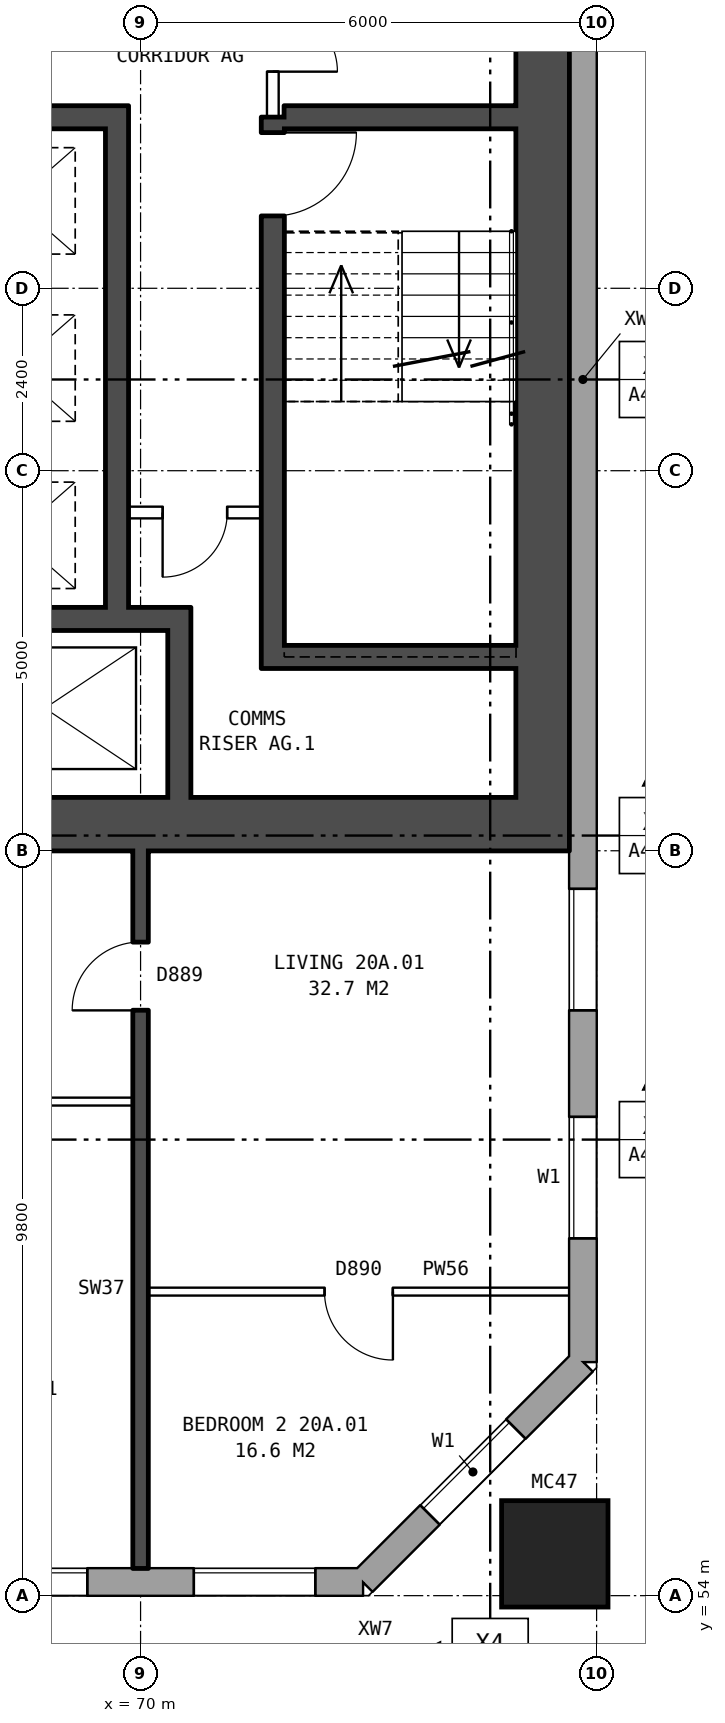
"""IFC4 building model, lengths in metres.
Left out: names, types, materials, properties, quantities, classifications, styles, units other than length and angle.
Written with IfcOpenShell. Run it as: python <this file> out.ifc"""

import sys

from ifc_helpers import new_model, si_unit, direction, frame, frame_2d, origin, origin_2d, place, context, subcontext, project, spatial, rectangle, hollow_rectangle, extrude, element, fill, save


model = new_model("IFC4")
c1 = context("Model", 3, precision=1e-05, world=origin(), true_north=direction((0.0, 1.0)))
c2 = subcontext(c1, "Body", "Model", "MODEL_VIEW")
j1 = project(units=[si_unit("LENGTHUNIT", "METRE"), si_unit("PLANEANGLEUNIT", "RADIAN")], contexts=[c1])
p1 = place(None, origin())
s1 = spatial("IfcSite", under=j1, at=p1, CompositionType="ELEMENT")
p2 = place(p1, origin())
s2 = spatial("IfcBuilding", under=s1, at=p2, CompositionType="ELEMENT")
p3 = place(p2, frame((0.0, 0.0, 74.7)))
s3 = spatial("IfcBuildingStorey", under=s2, at=p3, CompositionType="ELEMENT", Elevation=74.7)
p4 = place(p3, frame((75.45, 54.55, 0.0), z_axis=(0.0, 0.0, 1.0), x_axis=(1.0, 0.0, 0.0)))
e1 = element("IfcColumn", 1, at=p4, inside=s3, PredefinedType="COLUMN", context=c2, shape_type="SweptSolid", body=[
    extrude(hollow_rectangle(XDim=1.4, YDim=1.4, WallThickness=0.075, at=origin_2d()), origin(), (0.0, 0.0, 1.0), 3.1),
])
p5 = place(p3, frame((26.325, 54.18, 0.0), z_axis=(0.0, 0.0, 1.0), x_axis=(1.0, 0.0, 0.0)))
e2 = element("IfcWall", 2, at=p5, inside=s3, PredefinedType="STANDARD", context=c2, shape_type="SweptSolid", body=[
    extrude(rectangle(XDim=46.601, YDim=0.36, at=frame_2d((23.3, 0.0))), origin(), (0.0, 0.0, 1.0), 2.85),
])
p6 = place(p5, frame((2.375, 0.0, 0.8)))
e3 = element("IfcOpeningElement", 3, at=p6, cuts=e2, PredefinedType="OPENING", context=c2, shape_type="SweptSolid", body=[
    extrude(rectangle(XDim=1.6, YDim=1.8, at=frame_2d((0.8, 0.9))), frame((0.0, 0.19, 0.0), z_axis=(0.0, -1.0, 0.0), x_axis=(1.0, 0.0, 0.0)), (0.0, 0.0, 1.0), 0.38),
])
p7 = place(p5, frame((4.275, 0.0, 0.8)))
e4 = element("IfcOpeningElement", 4, at=p7, cuts=e2, PredefinedType="OPENING", context=c2, shape_type="SweptSolid", body=[
    extrude(rectangle(XDim=1.6, YDim=1.8, at=frame_2d((0.8, 0.9))), frame((0.0, 0.19, 0.0), z_axis=(0.0, -1.0, 0.0), x_axis=(1.0, 0.0, 0.0)), (0.0, 0.0, 1.0), 0.38),
])
p8 = place(p5, frame((8.275, 0.0, 0.8)))
e5 = element("IfcOpeningElement", 5, at=p8, cuts=e2, PredefinedType="OPENING", context=c2, shape_type="SweptSolid", body=[
    extrude(rectangle(XDim=0.8, YDim=0.9, at=frame_2d((0.4, 0.45))), frame((0.0, 0.19, 0.0), z_axis=(0.0, -1.0, 0.0), x_axis=(1.0, 0.0, 0.0)), (0.0, 0.0, 1.0), 0.38),
])
p9 = place(p5, frame((11.375, 0.0, 0.8)))
e6 = element("IfcOpeningElement", 6, at=p9, cuts=e2, PredefinedType="OPENING", context=c2, shape_type="SweptSolid", body=[
    extrude(rectangle(XDim=1.6, YDim=1.8, at=frame_2d((0.8, 0.9))), frame((0.0, 0.19, 0.0), z_axis=(0.0, -1.0, 0.0), x_axis=(1.0, 0.0, 0.0)), (0.0, 0.0, 1.0), 0.38),
])
p10 = place(p5, frame((14.375, 0.0, 0.8)))
e7 = element("IfcOpeningElement", 7, at=p10, cuts=e2, PredefinedType="OPENING", context=c2, shape_type="SweptSolid", body=[
    extrude(rectangle(XDim=1.6, YDim=1.8, at=frame_2d((0.8, 0.9))), frame((0.0, 0.19, 0.0), z_axis=(0.0, -1.0, 0.0), x_axis=(1.0, 0.0, 0.0)), (0.0, 0.0, 1.0), 0.38),
])
p11 = place(p5, frame((17.375, 0.0, 0.8)))
e8 = element("IfcOpeningElement", 8, at=p11, cuts=e2, PredefinedType="OPENING", context=c2, shape_type="SweptSolid", body=[
    extrude(rectangle(XDim=1.6, YDim=1.8, at=frame_2d((0.8, 0.9))), frame((0.0, 0.19, 0.0), z_axis=(0.0, -1.0, 0.0), x_axis=(1.0, 0.0, 0.0)), (0.0, 0.0, 1.0), 0.38),
])
p12 = place(p5, frame((20.375, 0.0, 0.8)))
e9 = element("IfcOpeningElement", 9, at=p12, cuts=e2, PredefinedType="OPENING", context=c2, shape_type="SweptSolid", body=[
    extrude(rectangle(XDim=1.6, YDim=1.8, at=frame_2d((0.8, 0.9))), frame((0.0, 0.19, 0.0), z_axis=(0.0, -1.0, 0.0), x_axis=(1.0, 0.0, 0.0)), (0.0, 0.0, 1.0), 0.38),
])
p13 = place(p5, frame((23.375, 0.0, 0.8)))
e10 = element("IfcOpeningElement", 10, at=p13, cuts=e2, PredefinedType="OPENING", context=c2, shape_type="SweptSolid", body=[
    extrude(rectangle(XDim=1.6, YDim=1.8, at=frame_2d((0.8, 0.9))), frame((0.0, 0.19, 0.0), z_axis=(0.0, -1.0, 0.0), x_axis=(1.0, 0.0, 0.0)), (0.0, 0.0, 1.0), 0.38),
])
p14 = place(p5, frame((26.375, 0.0, 0.8)))
e11 = element("IfcOpeningElement", 11, at=p14, cuts=e2, PredefinedType="OPENING", context=c2, shape_type="SweptSolid", body=[
    extrude(rectangle(XDim=1.6, YDim=1.8, at=frame_2d((0.8, 0.9))), frame((0.0, 0.19, 0.0), z_axis=(0.0, -1.0, 0.0), x_axis=(1.0, 0.0, 0.0)), (0.0, 0.0, 1.0), 0.38),
])
p15 = place(p5, frame((29.375, 0.0, 0.8)))
e12 = element("IfcOpeningElement", 12, at=p15, cuts=e2, PredefinedType="OPENING", context=c2, shape_type="SweptSolid", body=[
    extrude(rectangle(XDim=1.6, YDim=1.8, at=frame_2d((0.8, 0.9))), frame((0.0, 0.19, 0.0), z_axis=(0.0, -1.0, 0.0), x_axis=(1.0, 0.0, 0.0)), (0.0, 0.0, 1.0), 0.38),
])
p16 = place(p5, frame((32.375, 0.0, 0.8)))
e13 = element("IfcOpeningElement", 13, at=p16, cuts=e2, PredefinedType="OPENING", context=c2, shape_type="SweptSolid", body=[
    extrude(rectangle(XDim=1.6, YDim=1.8, at=frame_2d((0.8, 0.9))), frame((0.0, 0.19, 0.0), z_axis=(0.0, -1.0, 0.0), x_axis=(1.0, 0.0, 0.0)), (0.0, 0.0, 1.0), 0.38),
])
p17 = place(p5, frame((35.375, 0.0, 0.8)))
e14 = element("IfcOpeningElement", 14, at=p17, cuts=e2, PredefinedType="OPENING", context=c2, shape_type="SweptSolid", body=[
    extrude(rectangle(XDim=1.6, YDim=1.8, at=frame_2d((0.8, 0.9))), frame((0.0, 0.19, 0.0), z_axis=(0.0, -1.0, 0.0), x_axis=(1.0, 0.0, 0.0)), (0.0, 0.0, 1.0), 0.38),
])
p18 = place(p5, frame((39.625, 0.0, 1.7)))
e15 = element("IfcOpeningElement", 15, at=p18, cuts=e2, PredefinedType="OPENING", context=c2, shape_type="SweptSolid", body=[
    extrude(rectangle(XDim=1.4, YDim=0.9, at=frame_2d((0.7, 0.45))), frame((0.0, 0.19, 0.0), z_axis=(0.0, -1.0, 0.0), x_axis=(1.0, 0.0, 0.0)), (0.0, 0.0, 1.0), 0.38),
])
p19 = place(p5, frame((41.375, 0.0, 0.8)))
e16 = element("IfcOpeningElement", 16, at=p19, cuts=e2, PredefinedType="OPENING", context=c2, shape_type="SweptSolid", body=[
    extrude(rectangle(XDim=1.6, YDim=1.8, at=frame_2d((0.8, 0.9))), frame((0.0, 0.19, 0.0), z_axis=(0.0, -1.0, 0.0), x_axis=(1.0, 0.0, 0.0)), (0.0, 0.0, 1.0), 0.38),
])
p20 = place(p5, frame((44.375, 0.0, 0.8)))
e17 = element("IfcOpeningElement", 17, at=p20, cuts=e2, PredefinedType="OPENING", context=c2, shape_type="SweptSolid", body=[
    extrude(rectangle(XDim=1.6, YDim=1.8, at=frame_2d((0.8, 0.9))), frame((0.0, 0.19, 0.0), z_axis=(0.0, -1.0, 0.0), x_axis=(1.0, 0.0, 0.0)), (0.0, 0.0, 1.0), 0.38),
])
p21 = place(p5, frame((6.175, 0.0, 1.7)))
e18 = element("IfcOpeningElement", 18, at=p21, cuts=e2, PredefinedType="OPENING", context=c2, shape_type="SweptSolid", body=[
    extrude(rectangle(XDim=0.8, YDim=0.9, at=frame_2d((0.4, 0.45))), frame((0.0, 0.19, 0.0), z_axis=(0.0, -1.0, 0.0), x_axis=(1.0, 0.0, 0.0)), (0.0, 0.0, 1.0), 0.38),
])
p22 = place(p5, frame((9.375, 0.0, 0.8)))
e19 = element("IfcOpeningElement", 19, at=p22, cuts=e2, PredefinedType="OPENING", context=c2, shape_type="SweptSolid", body=[
    extrude(rectangle(XDim=1.0, YDim=1.8, at=frame_2d((0.5, 0.9))), frame((0.0, 0.19, 0.0), z_axis=(0.0, -1.0, 0.0), x_axis=(1.0, 0.0, 0.0)), (0.0, 0.0, 1.0), 0.38),
])
p23 = place(p3, frame((72.925, 54.18, 0.0), z_axis=(0.0, 0.0, 1.0), x_axis=(0.707106781187, 0.707106781187, 0.0)))
e20 = element("IfcWall", 20, at=p23, inside=s3, PredefinedType="STANDARD", context=c2, shape_type="SweptSolid", body=[
    extrude(rectangle(XDim=4.094, YDim=0.36, at=frame_2d((2.047, 0.0))), origin(), (0.0, 0.0, 1.0), 2.85),
])
p24 = place(p23, frame((1.247, 0.0, 0.8)))
e21 = element("IfcOpeningElement", 21, at=p24, cuts=e20, PredefinedType="OPENING", context=c2, shape_type="SweptSolid", body=[
    extrude(rectangle(XDim=1.6, YDim=1.8, at=frame_2d((0.8, 0.9))), frame((0.0, 0.19, 0.0), z_axis=(0.0, -1.0, 0.0), x_axis=(1.0, 0.0, 0.0)), (0.0, 0.0, 1.0), 0.38),
])
p25 = place(p3, frame((75.82, 57.075, 0.0), z_axis=(0.0, 0.0, 1.0), x_axis=(0.0, 1.0, 0.0)))
e22 = element("IfcWall", 22, at=p25, inside=s3, PredefinedType="STANDARD", context=c2, shape_type="SweptSolid", body=[
    extrude(rectangle(XDim=25.851, YDim=0.36, at=frame_2d((12.925, 0.0))), origin(), (0.0, 0.0, 1.0), 2.85),
])
p26 = place(p25, frame((1.625, 0.0, 0.8)))
e23 = element("IfcOpeningElement", 23, at=p26, cuts=e22, PredefinedType="OPENING", context=c2, shape_type="SweptSolid", body=[
    extrude(rectangle(XDim=1.6, YDim=1.8, at=frame_2d((0.8, 0.9))), frame((0.0, 0.19, 0.0), z_axis=(0.0, -1.0, 0.0), x_axis=(1.0, 0.0, 0.0)), (0.0, 0.0, 1.0), 0.38),
])
p27 = place(p25, frame((4.625, 0.0, 0.8)))
e24 = element("IfcOpeningElement", 24, at=p27, cuts=e22, PredefinedType="OPENING", context=c2, shape_type="SweptSolid", body=[
    extrude(rectangle(XDim=1.6, YDim=1.8, at=frame_2d((0.8, 0.9))), frame((0.0, 0.19, 0.0), z_axis=(0.0, -1.0, 0.0), x_axis=(1.0, 0.0, 0.0)), (0.0, 0.0, 1.0), 0.38),
])
p28 = place(p25, frame((19.625, 0.0, 0.8)))
e25 = element("IfcOpeningElement", 25, at=p28, cuts=e22, PredefinedType="OPENING", context=c2, shape_type="SweptSolid", body=[
    extrude(rectangle(XDim=1.6, YDim=1.8, at=frame_2d((0.8, 0.9))), frame((0.0, 0.19, 0.0), z_axis=(0.0, -1.0, 0.0), x_axis=(1.0, 0.0, 0.0)), (0.0, 0.0, 1.0), 0.38),
])
p29 = place(p25, frame((22.625, 0.0, 0.8)))
e26 = element("IfcOpeningElement", 26, at=p29, cuts=e22, PredefinedType="OPENING", context=c2, shape_type="SweptSolid", body=[
    extrude(rectangle(XDim=1.6, YDim=1.8, at=frame_2d((0.8, 0.9))), frame((0.0, 0.19, 0.0), z_axis=(0.0, -1.0, 0.0), x_axis=(1.0, 0.0, 0.0)), (0.0, 0.0, 1.0), 0.38),
])
p30 = place(p3, frame((75.29, 64.5, 0.0), z_axis=(0.0, 0.0, 1.0), x_axis=(0.0, 1.0, 0.0)))
e27 = element("IfcWall", 27, at=p30, inside=s3, PredefinedType="SHEAR", context=c2, shape_type="SweptSolid", body=[
    extrude(rectangle(XDim=11.0, YDim=0.7, at=frame_2d((5.5, 0.0))), origin(), (0.0, 0.0, 1.0), 2.85),
])
p31 = place(p3, frame((66.64, 64.15, 0.0), z_axis=(0.0, 0.0, 1.0), x_axis=(1.0, 0.0, 0.0)))
e28 = element("IfcWall", 28, at=p31, inside=s3, PredefinedType="SHEAR", context=c2, shape_type="SweptSolid", body=[
    extrude(rectangle(XDim=9.0, YDim=0.7, at=frame_2d((4.5, 0.0))), origin(), (0.0, 0.0, 1.0), 2.85),
])
p32 = place(p3, frame((71.89, 66.35, 0.0), z_axis=(0.0, 0.0, 1.0), x_axis=(1.0, 0.0, 0.0)))
e29 = element("IfcWall", 29, at=p32, inside=s3, PredefinedType="SHEAR", context=c2, shape_type="SweptSolid", body=[
    extrude(rectangle(XDim=3.05, YDim=0.3, at=frame_2d((1.525, 0.0))), origin(), (0.0, 0.0, 1.0), 2.85),
])
p33 = place(p3, frame((67.34, 66.85, 0.0), z_axis=(0.0, 0.0, 1.0), x_axis=(1.0, 0.0, 0.0)))
e30 = element("IfcWall", 30, at=p33, inside=s3, PredefinedType="SHEAR", context=c2, shape_type="SweptSolid", body=[
    extrude(rectangle(XDim=3.32, YDim=0.3, at=frame_2d((1.66, 0.0))), origin(), (0.0, 0.0, 1.0), 2.85),
])
p34 = place(p3, frame((69.84, 68.25, 0.0), z_axis=(0.0, 0.0, 1.0), x_axis=(1.0, 0.0, 0.0)))
e31 = element("IfcWall", 31, at=p34, inside=s3, PredefinedType="PARTITIONING", context=c2, shape_type="SweptSolid", body=[
    extrude(rectangle(XDim=1.75, YDim=0.15, at=frame_2d((0.875, 0.0))), origin(), (0.0, 0.0, 1.0), 2.85),
])
p35 = place(p34, frame((0.45, 0.0, 0.0)))
e32 = element("IfcOpeningElement", 32, at=p35, cuts=e31, PredefinedType="OPENING", context=c2, shape_type="SweptSolid", body=[
    extrude(rectangle(XDim=0.85, YDim=2.1, at=frame_2d((0.425, 1.05))), frame((0.0, 0.085, 0.0), z_axis=(0.0, -1.0, 0.0), x_axis=(1.0, 0.0, 0.0)), (0.0, 0.0, 1.0), 0.17),
])
p36 = place(p3, frame((67.34, 73.45, 0.0), z_axis=(0.0, 0.0, 1.0), x_axis=(1.0, 0.0, 0.0)))
e33 = element("IfcWall", 33, at=p36, inside=s3, PredefinedType="SHEAR", context=c2, shape_type="SweptSolid", body=[
    extrude(rectangle(XDim=2.2, YDim=0.3, at=frame_2d((1.1, 0.0))), origin(), (0.0, 0.0, 1.0), 2.85),
])
p37 = place(p3, frame((71.89, 73.45, 0.0), z_axis=(0.0, 0.0, 1.0), x_axis=(1.0, 0.0, 0.0)))
e34 = element("IfcWall", 34, at=p37, inside=s3, PredefinedType="SHEAR", context=c2, shape_type="SweptSolid", body=[
    extrude(rectangle(XDim=3.05, YDim=0.3, at=frame_2d((1.525, 0.0))), origin(), (0.0, 0.0, 1.0), 2.85),
])
p38 = place(p3, frame((69.69, 67.0, 0.0), z_axis=(0.0, 0.0, 1.0), x_axis=(0.0, 1.0, 0.0)))
e35 = element("IfcWall", 35, at=p38, inside=s3, PredefinedType="SHEAR", context=c2, shape_type="SweptSolid", body=[
    extrude(rectangle(XDim=6.6, YDim=0.3, at=frame_2d((3.3, 0.0))), origin(), (0.0, 0.0, 1.0), 2.85),
])
p39 = place(p3, frame((70.51, 64.5, 0.0), z_axis=(0.0, 0.0, 1.0), x_axis=(0.0, 1.0, 0.0)))
e36 = element("IfcWall", 36, at=p39, inside=s3, PredefinedType="SHEAR", context=c2, shape_type="SweptSolid", body=[
    extrude(rectangle(XDim=2.2, YDim=0.3, at=frame_2d((1.1, 0.0))), origin(), (0.0, 0.0, 1.0), 2.85),
])
p40 = place(p3, frame((71.74, 66.2, 0.0), z_axis=(0.0, 0.0, 1.0), x_axis=(0.0, 1.0, 0.0)))
e37 = element("IfcWall", 37, at=p40, inside=s3, PredefinedType="SHEAR", context=c2, shape_type="SweptSolid", body=[
    extrude(rectangle(XDim=7.25, YDim=0.3, at=frame_2d((3.625, 0.0))), origin(), (0.0, 0.0, 1.0), 2.85),
])
p41 = place(p40, frame((5.95, 0.0, 0.0)))
e38 = element("IfcOpeningElement", 38, at=p41, cuts=e37, PredefinedType="OPENING", context=c2, shape_type="SweptSolid", body=[
    extrude(rectangle(XDim=1.1, YDim=2.1, at=frame_2d((0.55, 1.05))), frame((0.0, 0.16, 0.0), z_axis=(0.0, -1.0, 0.0), x_axis=(1.0, 0.0, 0.0)), (0.0, 0.0, 1.0), 0.32),
])
p42 = place(p3, frame((71.74, 73.45, 0.0), z_axis=(0.0, 0.0, 1.0), x_axis=(0.0, 1.0, 0.0)))
e39 = element("IfcWall", 39, at=p42, inside=s3, PredefinedType="PARTITIONING", context=c2, shape_type="SweptSolid", body=[
    extrude(rectangle(XDim=2.05, YDim=0.15, at=frame_2d((1.025, 0.0))), origin(), (0.0, 0.0, 1.0), 2.85),
])
p43 = place(p42, frame((0.6, 0.0, 0.0)))
e40 = element("IfcOpeningElement", 40, at=p43, cuts=e39, PredefinedType="OPENING", context=c2, shape_type="SweptSolid", body=[
    extrude(rectangle(XDim=0.85, YDim=2.1, at=frame_2d((0.425, 1.05))), frame((0.0, 0.085, 0.0), z_axis=(0.0, -1.0, 0.0), x_axis=(1.0, 0.0, 0.0)), (0.0, 0.0, 1.0), 0.17),
])
p44 = place(p3, frame((70.1, 58.0, 0.0), z_axis=(0.0, 0.0, 1.0), x_axis=(1.0, 0.0, 0.0)))
e41 = element("IfcWall", 41, at=p44, inside=s3, PredefinedType="PARTITIONING", context=c2, shape_type="SweptSolid", body=[
    extrude(rectangle(XDim=5.54, YDim=0.1, at=frame_2d((2.77, 0.0))), origin(), (0.0, 0.0, 1.0), 2.85),
])
p45 = place(p44, frame((2.32, 0.0, 0.0)))
e42 = element("IfcOpeningElement", 42, at=p45, cuts=e41, PredefinedType="OPENING", context=c2, shape_type="SweptSolid", body=[
    extrude(rectangle(XDim=0.9, YDim=2.1, at=frame_2d((0.45, 1.05))), frame((0.0, 0.06, 0.0), z_axis=(0.0, -1.0, 0.0), x_axis=(1.0, 0.0, 0.0)), (0.0, 0.0, 1.0), 0.12),
])
p46 = place(p3, frame((64.1, 60.5, 0.0), z_axis=(0.0, 0.0, 1.0), x_axis=(1.0, 0.0, 0.0)))
e43 = element("IfcWall", 43, at=p46, inside=s3, PredefinedType="PARTITIONING", context=c2, shape_type="SweptSolid", body=[
    extrude(rectangle(XDim=5.8, YDim=0.1, at=frame_2d((2.9, 0.0))), origin(), (0.0, 0.0, 1.0), 2.85),
])
p47 = place(p46, frame((3.6, 0.0, 0.0)))
e44 = element("IfcOpeningElement", 44, at=p47, cuts=e43, PredefinedType="OPENING", context=c2, shape_type="SweptSolid", body=[
    extrude(rectangle(XDim=0.9, YDim=2.1, at=frame_2d((0.45, 1.05))), frame((0.0, 0.06, 0.0), z_axis=(0.0, -1.0, 0.0), x_axis=(1.0, 0.0, 0.0)), (0.0, 0.0, 1.0), 0.12),
])
p48 = place(p46, frame((0.7, 0.0, 0.0)))
e45 = element("IfcOpeningElement", 45, at=p48, cuts=e43, PredefinedType="OPENING", context=c2, shape_type="SweptSolid", body=[
    extrude(rectangle(XDim=0.9, YDim=2.1, at=frame_2d((0.45, 1.05))), frame((0.0, 0.06, 0.0), z_axis=(0.0, -1.0, 0.0), x_axis=(1.0, 0.0, 0.0)), (0.0, 0.0, 1.0), 0.12),
])
p49 = place(p3, frame((70.0, 54.36, 0.0), z_axis=(0.0, 0.0, 1.0), x_axis=(0.0, 1.0, 0.0)))
e46 = element("IfcWall", 46, at=p49, inside=s3, PredefinedType="SOLIDWALL", context=c2, shape_type="SweptSolid", body=[
    extrude(rectangle(XDim=9.44, YDim=0.2, at=frame_2d((4.72, 0.0))), origin(), (0.0, 0.0, 1.0), 2.85),
])
p50 = place(p49, frame((7.34, 0.0, 0.0)))
e47 = element("IfcOpeningElement", 47, at=p50, cuts=e46, PredefinedType="OPENING", context=c2, shape_type="SweptSolid", body=[
    extrude(rectangle(XDim=0.9, YDim=2.1, at=frame_2d((0.45, 1.05))), frame((0.0, 0.11, 0.0), z_axis=(0.0, -1.0, 0.0), x_axis=(1.0, 0.0, 0.0)), (0.0, 0.0, 1.0), 0.22),
])
p51 = place(p19, origin())
e48 = element("IfcWindow", 48, at=p51, inside=s3, PartitioningType="SINGLE_PANEL", PredefinedType="WINDOW", context=c2, shape_type="SweptSolid", body=[
    extrude(rectangle(XDim=1.6, YDim=1.8, at=frame_2d((0.8, 0.9))), frame((0.0, 0.15, 0.0), z_axis=(0.0, -1.0, 0.0), x_axis=(1.0, 0.0, 0.0)), (0.0, 0.0, 1.0), 0.06),
])
fill(e16, e48)
p52 = place(p20, origin())
e49 = element("IfcWindow", 49, at=p52, inside=s3, PartitioningType="SINGLE_PANEL", PredefinedType="WINDOW", context=c2, shape_type="SweptSolid", body=[
    extrude(rectangle(XDim=1.6, YDim=1.8, at=frame_2d((0.8, 0.9))), frame((0.0, 0.15, 0.0), z_axis=(0.0, -1.0, 0.0), x_axis=(1.0, 0.0, 0.0)), (0.0, 0.0, 1.0), 0.06),
])
fill(e17, e49)
p53 = place(p24, origin())
e50 = element("IfcWindow", 50, at=p53, inside=s3, PartitioningType="SINGLE_PANEL", PredefinedType="WINDOW", context=c2, shape_type="SweptSolid", body=[
    extrude(rectangle(XDim=1.6, YDim=1.8, at=frame_2d((0.8, 0.9))), frame((0.0, 0.15, 0.0), z_axis=(0.0, -1.0, 0.0), x_axis=(1.0, 0.0, 0.0)), (0.0, 0.0, 1.0), 0.06),
])
fill(e21, e50)
p54 = place(p26, origin())
e51 = element("IfcWindow", 51, at=p54, inside=s3, PartitioningType="SINGLE_PANEL", PredefinedType="WINDOW", context=c2, shape_type="SweptSolid", body=[
    extrude(rectangle(XDim=1.6, YDim=1.8, at=frame_2d((0.8, 0.9))), frame((0.0, 0.15, 0.0), z_axis=(0.0, -1.0, 0.0), x_axis=(1.0, 0.0, 0.0)), (0.0, 0.0, 1.0), 0.06),
])
fill(e23, e51)
p55 = place(p27, origin())
e52 = element("IfcWindow", 52, at=p55, inside=s3, PartitioningType="SINGLE_PANEL", PredefinedType="WINDOW", context=c2, shape_type="SweptSolid", body=[
    extrude(rectangle(XDim=1.6, YDim=1.8, at=frame_2d((0.8, 0.9))), frame((0.0, 0.15, 0.0), z_axis=(0.0, -1.0, 0.0), x_axis=(1.0, 0.0, 0.0)), (0.0, 0.0, 1.0), 0.06),
])
fill(e24, e52)
p56 = place(p41, frame((1.1, 0.0, 0.0), z_axis=(0.0, 0.0, 1.0), x_axis=(-1.0, 0.0, 0.0)))
e53 = element("IfcDoor", 53, at=p56, inside=s3, OperationType="SINGLE_SWING_LEFT", PredefinedType="DOOR", context=c2, shape_type="SweptSolid", body=[
    extrude(rectangle(XDim=1.1, YDim=2.1, at=frame_2d((0.55, 1.05))), frame((0.0, 0.025, 0.0), z_axis=(0.0, -1.0, 0.0), x_axis=(1.0, 0.0, 0.0)), (0.0, 0.0, 1.0), 0.05),
])
fill(e38, e53)
p57 = place(p35, frame((0.85, 0.0, 0.0), z_axis=(0.0, 0.0, 1.0), x_axis=(-1.0, 0.0, 0.0)))
e54 = element("IfcDoor", 54, at=p57, inside=s3, OperationType="SINGLE_SWING_RIGHT", PredefinedType="DOOR", context=c2, shape_type="SweptSolid", body=[
    extrude(rectangle(XDim=0.85, YDim=2.1, at=frame_2d((0.425, 1.05))), frame((0.0, 0.025, 0.0), z_axis=(0.0, -1.0, 0.0), x_axis=(1.0, 0.0, 0.0)), (0.0, 0.0, 1.0), 0.05),
])
fill(e32, e54)
p58 = place(p43, frame((0.85, 0.0, 0.0), z_axis=(0.0, 0.0, 1.0), x_axis=(-1.0, 0.0, 0.0)))
e55 = element("IfcDoor", 55, at=p58, inside=s3, OperationType="SINGLE_SWING_RIGHT", PredefinedType="DOOR", context=c2, shape_type="SweptSolid", body=[
    extrude(rectangle(XDim=0.85, YDim=2.1, at=frame_2d((0.425, 1.05))), frame((0.0, 0.025, 0.0), z_axis=(0.0, -1.0, 0.0), x_axis=(1.0, 0.0, 0.0)), (0.0, 0.0, 1.0), 0.05),
])
fill(e40, e55)
p59 = place(p45, frame((0.9, 0.0, 0.0), z_axis=(0.0, 0.0, 1.0), x_axis=(-1.0, 0.0, 0.0)))
e56 = element("IfcDoor", 56, at=p59, inside=s3, OperationType="SINGLE_SWING_LEFT", PredefinedType="DOOR", context=c2, shape_type="SweptSolid", body=[
    extrude(rectangle(XDim=0.9, YDim=2.1, at=frame_2d((0.45, 1.05))), frame((0.0, 0.025, 0.0), z_axis=(0.0, -1.0, 0.0), x_axis=(1.0, 0.0, 0.0)), (0.0, 0.0, 1.0), 0.05),
])
fill(e42, e56)
p60 = place(p50, origin())
e57 = element("IfcDoor", 57, at=p60, inside=s3, OperationType="SINGLE_SWING_LEFT", PredefinedType="DOOR", context=c2, shape_type="SweptSolid", body=[
    extrude(rectangle(XDim=0.9, YDim=2.1, at=frame_2d((0.45, 1.05))), frame((0.0, 0.025, 0.0), z_axis=(0.0, -1.0, 0.0), x_axis=(1.0, 0.0, 0.0)), (0.0, 0.0, 1.0), 0.05),
])
fill(e47, e57)
save(model, sys.argv[1])
